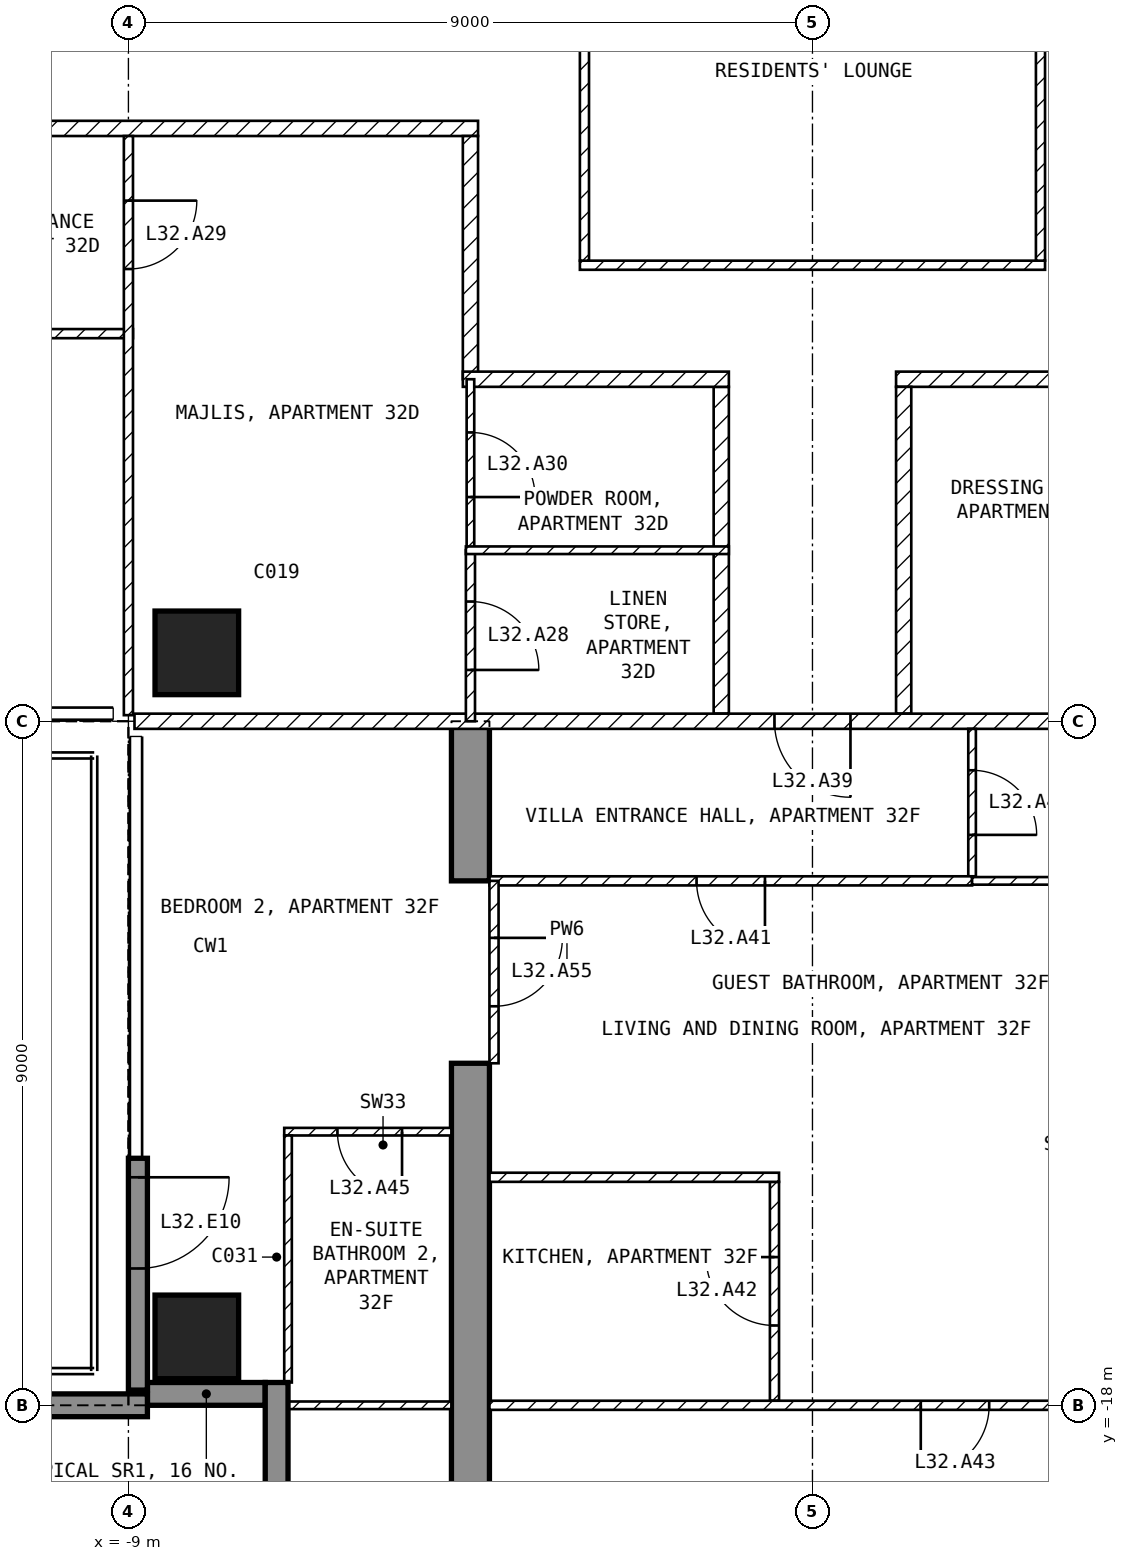
"""IFC4 building model, lengths in metres.
Left out: names, types, materials, properties, quantities, classifications, styles, units other than length and angle.
Written with IfcOpenShell. Run it as: python <this file> out.ifc"""

import sys

from ifc_helpers import new_model, si_unit, direction, frame, frame_2d, origin, origin_2d, place, context, subcontext, project, spatial, polyline, rectangle, outline, extrude, element, fill, save


model = new_model("IFC4")
c1 = context("Model", 3, precision=1e-05, world=origin(), true_north=direction((0.0, 1.0)))
c2 = subcontext(c1, "Body", "Model", "MODEL_VIEW")
j1 = project(units=[si_unit("LENGTHUNIT", "METRE"), si_unit("PLANEANGLEUNIT", "RADIAN")], contexts=[c1])
p1 = place(None, origin())
s1 = spatial("IfcSite", under=j1, at=p1, CompositionType="ELEMENT")
p2 = place(p1, origin())
s2 = spatial("IfcBuilding", under=s1, at=p2, CompositionType="ELEMENT")
p3 = place(p2, frame((0.0, 0.0, 133.9)))
s3 = spatial("IfcBuildingStorey", under=s2, at=p3, CompositionType="ELEMENT", Elevation=133.9)
for number, where, z_axis, x_axis in (
    (1, (-8.1, -17.1, -0.25), (0.0, 0.0, 1.0), (1.0, 0.0, 0.0)),
    (2, (-8.1, -8.1, -0.25), (0.0, 0.0, 1.0), (1.0, 0.0, 0.0)),
):
    element("IfcColumn", number, at=place(p3, frame(where, z_axis=z_axis, x_axis=x_axis)), inside=s3, PredefinedType="COLUMN", context=c2, shape_type="SweptSolid", body=[
        extrude(rectangle(XDim=1.1, YDim=1.1, at=origin_2d()), origin(), (0.0, 0.0, 1.0), 3.5),
    ])
p4 = place(p3, frame((-4.75, -20.15, -0.25), z_axis=(1.0, 0.0, 0.0), x_axis=(0.0, 1.0, 0.0)))
e3 = element("IfcWall", 3, at=p4, inside=s3, PredefinedType="SHEAR", context=c2, shape_type="SweptSolid", body=[
    extrude(outline(polyline([(0.0, 0.0), (6.65, 0.0), (6.65, 2.65), (9.05, 2.65), (9.05, 0.0), (11.15, 0.0), (11.15, 3.5), (0.0, 3.5), (0.0, 0.0)])), origin(), (0.0, 0.0, 1.0), 0.5),
])
p5 = place(p3, frame((-8.875, -14.75, 0.0), z_axis=(0.0, 0.0, 1.0), x_axis=(0.0, -1.0, 0.0)))
e4 = element("IfcWall", 4, at=p5, inside=s3, PredefinedType="SOLIDWALL", context=c2, shape_type="SweptSolid", body=[
    extrude(rectangle(XDim=3.05, YDim=0.25, at=frame_2d((1.525, 0.0))), origin(), (0.0, 0.0, 1.0), 3.25),
])
p6 = place(p5, frame((0.25, 0.0, 0.0)))
e5 = element("IfcOpeningElement", 5, at=p6, cuts=e4, PredefinedType="OPENING", context=c2, shape_type="SweptSolid", body=[
    extrude(rectangle(XDim=1.2, YDim=2.4, at=frame_2d((0.6, 1.2))), frame((0.0, 0.135, 0.0), z_axis=(0.0, -1.0, 0.0), x_axis=(1.0, 0.0, 0.0)), (0.0, 0.0, 1.0), 0.27),
])
p7 = place(p3, frame((-8.75, -17.85, 0.0), z_axis=(0.0, 0.0, 1.0), x_axis=(1.0, 0.0, 0.0)))
e6 = element("IfcWall", 6, at=p7, inside=s3, PredefinedType="SOLIDWALL", context=c2, shape_type="SweptSolid", body=[
    extrude(rectangle(XDim=1.55, YDim=0.3, at=frame_2d((0.775, 0.0))), origin(), (0.0, 0.0, 1.0), 3.25),
])
p8 = place(p3, frame((-7.05, -17.7, 0.0), z_axis=(0.0, 0.0, 1.0), x_axis=(0.0, -1.0, 0.0)))
e7 = element("IfcWall", 7, at=p8, inside=s3, PredefinedType="SOLIDWALL", context=c2, shape_type="SweptSolid", body=[
    extrude(rectangle(XDim=1.8, YDim=0.3, at=frame_2d((0.9, 0.0))), origin(), (0.0, 0.0, 1.0), 3.25),
])
p9 = place(p3, frame((-8.75, -18.0, 0.0), z_axis=(0.0, 0.0, 1.0), x_axis=(-1.0, 0.0, 0.0)))
e8 = element("IfcWall", 8, at=p9, inside=s3, PredefinedType="SOLIDWALL", context=c2, shape_type="SweptSolid", body=[
    extrude(rectangle(XDim=2.99, YDim=0.3, at=frame_2d((1.495, 0.0))), origin(), (0.0, 0.0, 1.0), 3.25),
])
p10 = place(p3, frame((-3.06, -3.0, 0.0), z_axis=(0.0, 0.0, 1.0), x_axis=(1.0, 0.0, 0.0)))
e9 = element("IfcWall", 9, at=p10, inside=s3, PredefinedType="PARTITIONING", context=c2, shape_type="SweptSolid", body=[
    extrude(rectangle(XDim=6.12, YDim=0.12, at=frame_2d((3.06, 0.0))), origin(), (0.0, 0.0, 1.0), 3.25),
])
for number, where, z_axis, x_axis in (
    (10, (3.0, -2.94, 0.0), (0.0, 0.0, 1.0), (0.0, 1.0, 0.0)),
    (11, (-3.0, 2.94, 0.0), (0.0, 0.0, 1.0), (0.0, -1.0, 0.0)),
):
    element("IfcWall", number, at=place(p3, frame(where, z_axis=z_axis, x_axis=x_axis)), inside=s3, PredefinedType="PARTITIONING", context=c2, shape_type="SweptSolid", body=[
        extrude(rectangle(XDim=5.88, YDim=0.12, at=frame_2d((2.94, 0.0))), origin(), (0.0, 0.0, 1.0), 3.25),
    ])
p11 = place(p3, frame((4.6, -4.5, 0.0), z_axis=(0.0, 0.0, 1.0), x_axis=(-1.0, 0.0, 0.0)))
e12 = element("IfcWall", 12, at=p11, inside=s3, PredefinedType="PARTITIONING", context=c2, shape_type="SweptSolid", body=[
    extrude(rectangle(XDim=3.5, YDim=0.2, at=frame_2d((1.75, 0.0))), origin(), (0.0, 0.0, 1.0), 3.25),
])
p12 = place(p3, frame((1.2, -4.6, 0.0), z_axis=(0.0, 0.0, 1.0), x_axis=(0.0, -1.0, 0.0)))
e13 = element("IfcWall", 13, at=p12, inside=s3, PredefinedType="PARTITIONING", context=c2, shape_type="SweptSolid", body=[
    extrude(rectangle(XDim=4.3, YDim=0.2, at=frame_2d((2.15, 0.0))), origin(), (0.0, 0.0, 1.0), 3.25),
])
p13 = place(p3, frame((-4.4, -1.2, 0.0), z_axis=(0.0, 0.0, 1.0), x_axis=(-1.0, 0.0, 0.0)))
e14 = element("IfcWall", 14, at=p13, inside=s3, PredefinedType="PARTITIONING", context=c2, shape_type="SweptSolid", body=[
    extrude(rectangle(XDim=17.2, YDim=0.2, at=frame_2d((8.6, 0.0))), origin(), (0.0, 0.0, 1.0), 3.25),
])
p14 = place(p13, frame((5.9, 0.0, 0.0)))
e15 = element("IfcOpeningElement", 15, at=p14, cuts=e14, PredefinedType="OPENING", context=c2, shape_type="SweptSolid", body=[
    extrude(rectangle(XDim=1.0, YDim=2.1, at=frame_2d((0.5, 1.05))), frame((0.0, 0.11, 0.0), z_axis=(0.0, -1.0, 0.0), x_axis=(1.0, 0.0, 0.0)), (0.0, 0.0, 1.0), 0.22),
])
p15 = place(p3, frame((-4.5, -4.5, 0.0), z_axis=(0.0, 0.0, 1.0), x_axis=(0.0, 1.0, 0.0)))
e16 = element("IfcWall", 16, at=p15, inside=s3, PredefinedType="PARTITIONING", context=c2, shape_type="SweptSolid", body=[
    extrude(rectangle(XDim=3.2, YDim=0.2, at=frame_2d((1.6, 0.0))), origin(), (0.0, 0.0, 1.0), 3.25),
])
p16 = place(p3, frame((-1.2, -8.9, 0.0), z_axis=(0.0, 0.0, 1.0), x_axis=(0.0, 1.0, 0.0)))
e17 = element("IfcWall", 17, at=p16, inside=s3, PredefinedType="PARTITIONING", context=c2, shape_type="SweptSolid", body=[
    extrude(rectangle(XDim=4.3, YDim=0.2, at=frame_2d((2.15, 0.0))), origin(), (0.0, 0.0, 1.0), 3.25),
])
p17 = place(p3, frame((-1.1, -4.5, 0.0), z_axis=(0.0, 0.0, 1.0), x_axis=(-1.0, 0.0, 0.0)))
e18 = element("IfcWall", 18, at=p17, inside=s3, PredefinedType="PARTITIONING", context=c2, shape_type="SweptSolid", body=[
    extrude(rectangle(XDim=3.5, YDim=0.2, at=frame_2d((1.75, 0.0))), origin(), (0.0, 0.0, 1.0), 3.25),
])
p18 = place(p3, frame((8.92, -9.0, 0.0), z_axis=(0.0, 0.0, 1.0), x_axis=(-1.0, 0.0, 0.0)))
e19 = element("IfcWall", 19, at=p18, inside=s3, PredefinedType="PARTITIONING", context=c2, shape_type="SweptSolid", body=[
    extrude(rectangle(XDim=17.84, YDim=0.2, at=frame_2d((8.92, 0.0))), origin(), (0.0, 0.0, 1.0), 3.25),
])
p19 = place(p18, frame((8.42, 0.0, 0.0)))
e20 = element("IfcOpeningElement", 20, at=p19, cuts=e19, PredefinedType="OPENING", context=c2, shape_type="SweptSolid", body=[
    extrude(rectangle(XDim=1.0, YDim=2.1, at=frame_2d((0.5, 1.05))), frame((0.0, 0.11, 0.0), z_axis=(0.0, -1.0, 0.0), x_axis=(1.0, 0.0, 0.0)), (0.0, 0.0, 1.0), 0.22),
])
p20 = place(p3, frame((-8.94, -3.9, 0.0), z_axis=(0.0, 0.0, 1.0), x_axis=(-1.0, 0.0, 0.0)))
e21 = element("IfcWall", 21, at=p20, inside=s3, PredefinedType="PARTITIONING", context=c2, shape_type="SweptSolid", body=[
    extrude(rectangle(XDim=8.46, YDim=0.12, at=frame_2d((4.23, 0.0))), origin(), (0.0, 0.0, 1.0), 3.25),
])
p21 = place(p20, frame((7.11, 0.0, 0.0)))
e22 = element("IfcOpeningElement", 22, at=p21, cuts=e21, PredefinedType="OPENING", context=c2, shape_type="SweptSolid", body=[
    extrude(rectangle(XDim=0.9, YDim=2.1, at=frame_2d((0.45, 1.05))), frame((0.0, 0.07, 0.0), z_axis=(0.0, -1.0, 0.0), x_axis=(1.0, 0.0, 0.0)), (0.0, 0.0, 1.0), 0.14),
])
p22 = place(p20, frame((1.41, 0.0, 0.0)))
e23 = element("IfcOpeningElement", 23, at=p22, cuts=e21, PredefinedType="OPENING", context=c2, shape_type="SweptSolid", body=[
    extrude(rectangle(XDim=0.9, YDim=2.1, at=frame_2d((0.45, 1.05))), frame((0.0, 0.07, 0.0), z_axis=(0.0, -1.0, 0.0), x_axis=(1.0, 0.0, 0.0)), (0.0, 0.0, 1.0), 0.14),
])
p23 = place(p3, frame((-9.0, -1.3, 0.0), z_axis=(0.0, 0.0, 1.0), x_axis=(0.0, -1.0, 0.0)))
e24 = element("IfcWall", 24, at=p23, inside=s3, PredefinedType="PARTITIONING", context=c2, shape_type="SweptSolid", body=[
    extrude(rectangle(XDim=7.62, YDim=0.12, at=frame_2d((3.81, 0.0))), origin(), (0.0, 0.0, 1.0), 3.25),
])
p24 = place(p23, frame((0.85, 0.0, 0.0)))
e25 = element("IfcOpeningElement", 25, at=p24, cuts=e24, PredefinedType="OPENING", context=c2, shape_type="SweptSolid", body=[
    extrude(rectangle(XDim=0.9, YDim=2.1, at=frame_2d((0.45, 1.05))), frame((0.0, 0.07, 0.0), z_axis=(0.0, -1.0, 0.0), x_axis=(1.0, 0.0, 0.0)), (0.0, 0.0, 1.0), 0.14),
])
p25 = place(p3, frame((-4.5, -4.5, 0.0), z_axis=(0.0, 0.0, 1.0), x_axis=(0.0, -1.0, 0.0)))
e26 = element("IfcWall", 26, at=p25, inside=s3, PredefinedType="PARTITIONING", context=c2, shape_type="SweptSolid", body=[
    extrude(rectangle(XDim=2.25, YDim=0.1, at=frame_2d((1.125, 0.0))), origin(), (0.0, 0.0, 1.0), 3.25),
])
p26 = place(p25, frame((0.7, 0.0, 0.0)))
e27 = element("IfcOpeningElement", 27, at=p26, cuts=e26, PredefinedType="OPENING", context=c2, shape_type="SweptSolid", body=[
    extrude(rectangle(XDim=0.85, YDim=2.1, at=frame_2d((0.425, 1.05))), frame((0.0, 0.06, 0.0), z_axis=(0.0, -1.0, 0.0), x_axis=(1.0, 0.0, 0.0)), (0.0, 0.0, 1.0), 0.12),
])
p27 = place(p3, frame((-4.5, -6.75, 0.0), z_axis=(0.0, 0.0, 1.0), x_axis=(0.0, -1.0, 0.0)))
e28 = element("IfcWall", 28, at=p27, inside=s3, PredefinedType="PARTITIONING", context=c2, shape_type="SweptSolid", body=[
    extrude(rectangle(XDim=2.25, YDim=0.12, at=frame_2d((1.125, 0.0))), origin(), (0.0, 0.0, 1.0), 3.25),
])
p28 = place(p27, frame((0.675, 0.0, 0.0)))
e29 = element("IfcOpeningElement", 29, at=p28, cuts=e28, PredefinedType="OPENING", context=c2, shape_type="SweptSolid", body=[
    extrude(rectangle(XDim=0.9, YDim=2.1, at=frame_2d((0.45, 1.05))), frame((0.0, 0.07, 0.0), z_axis=(0.0, -1.0, 0.0), x_axis=(1.0, 0.0, 0.0)), (0.0, 0.0, 1.0), 0.14),
])
p29 = place(p3, frame((-1.1, -6.75, 0.0), z_axis=(0.0, 0.0, 1.0), x_axis=(-1.0, 0.0, 0.0)))
e30 = element("IfcWall", 30, at=p29, inside=s3, PredefinedType="PARTITIONING", context=c2, shape_type="SweptSolid", body=[
    extrude(rectangle(XDim=3.46, YDim=0.1, at=frame_2d((1.73, 0.0))), origin(), (0.0, 0.0, 1.0), 3.25),
])
p30 = place(p3, frame((2.1, -9.1, 0.0), z_axis=(0.0, 0.0, 1.0), x_axis=(0.0, -1.0, 0.0)))
e31 = element("IfcWall", 31, at=p30, inside=s3, PredefinedType="PARTITIONING", context=c2, shape_type="SweptSolid", body=[
    extrude(rectangle(XDim=1.94, YDim=0.1, at=frame_2d((0.97, 0.0))), origin(), (0.0, 0.0, 1.0), 3.25),
])
p31 = place(p30, frame((0.545, 0.0, 0.0)))
e32 = element("IfcOpeningElement", 32, at=p31, cuts=e31, PredefinedType="OPENING", context=c2, shape_type="SweptSolid", body=[
    extrude(rectangle(XDim=0.85, YDim=2.1, at=frame_2d((0.425, 1.05))), frame((0.0, 0.06, 0.0), z_axis=(0.0, -1.0, 0.0), x_axis=(1.0, 0.0, 0.0)), (0.0, 0.0, 1.0), 0.12),
])
p32 = place(p3, frame((2.1, -11.1, 0.0), z_axis=(0.0, 0.0, 1.0), x_axis=(-1.0, 0.0, 0.0)))
e33 = element("IfcWall", 33, at=p32, inside=s3, PredefinedType="PARTITIONING", context=c2, shape_type="SweptSolid", body=[
    extrude(rectangle(XDim=6.35, YDim=0.12, at=frame_2d((3.175, 0.0))), origin(), (0.0, 0.0, 1.0), 3.25),
])
p33 = place(p32, frame((2.725, 0.0, 0.0)))
e34 = element("IfcOpeningElement", 34, at=p33, cuts=e33, PredefinedType="OPENING", context=c2, shape_type="SweptSolid", body=[
    extrude(rectangle(XDim=0.9, YDim=2.1, at=frame_2d((0.45, 1.05))), frame((0.0, 0.07, 0.0), z_axis=(0.0, -1.0, 0.0), x_axis=(1.0, 0.0, 0.0)), (0.0, 0.0, 1.0), 0.14),
])
p34 = place(p3, frame((4.25, -11.1, 0.0), z_axis=(0.0, 0.0, 1.0), x_axis=(-1.0, 0.0, 0.0)))
e35 = element("IfcWall", 35, at=p34, inside=s3, PredefinedType="PARTITIONING", context=c2, shape_type="SweptSolid", body=[
    extrude(rectangle(XDim=2.15, YDim=0.1, at=frame_2d((1.075, 0.0))), origin(), (0.0, 0.0, 1.0), 3.25),
])
p35 = place(p3, frame((-0.5, -17.94, 0.0), z_axis=(0.0, 0.0, 1.0), x_axis=(0.0, 1.0, 0.0)))
e36 = element("IfcWall", 36, at=p35, inside=s3, PredefinedType="PARTITIONING", context=c2, shape_type="SweptSolid", body=[
    extrude(rectangle(XDim=2.88, YDim=0.12, at=frame_2d((1.44, 0.0))), origin(), (0.0, 0.0, 1.0), 3.25),
])
p36 = place(p35, frame((0.99, 0.0, 0.0)))
e37 = element("IfcOpeningElement", 37, at=p36, cuts=e36, PredefinedType="OPENING", context=c2, shape_type="SweptSolid", body=[
    extrude(rectangle(XDim=0.9, YDim=2.1, at=frame_2d((0.45, 1.05))), frame((0.0, 0.07, 0.0), z_axis=(0.0, -1.0, 0.0), x_axis=(1.0, 0.0, 0.0)), (0.0, 0.0, 1.0), 0.14),
])
p37 = place(p3, frame((-0.44, -15.0, 0.0), z_axis=(0.0, 0.0, 1.0), x_axis=(-1.0, 0.0, 0.0)))
e38 = element("IfcWall", 38, at=p37, inside=s3, PredefinedType="PARTITIONING", context=c2, shape_type="SweptSolid", body=[
    extrude(rectangle(XDim=3.81, YDim=0.12, at=frame_2d((1.905, 0.0))), origin(), (0.0, 0.0, 1.0), 3.25),
])
p38 = place(p3, frame((4.25, -18.0, 0.0), z_axis=(0.0, 0.0, 1.0), x_axis=(-1.0, 0.0, 0.0)))
e39 = element("IfcWall", 39, at=p38, inside=s3, PredefinedType="PARTITIONING", context=c2, shape_type="SweptSolid", body=[
    extrude(rectangle(XDim=8.5, YDim=0.12, at=frame_2d((4.25, 0.0))), origin(), (0.0, 0.0, 1.0), 3.25),
])
p39 = place(p38, frame((1.925, 0.0, 0.0)))
e40 = element("IfcOpeningElement", 40, at=p39, cuts=e39, PredefinedType="OPENING", context=c2, shape_type="SweptSolid", body=[
    extrude(rectangle(XDim=0.9, YDim=2.1, at=frame_2d((0.45, 1.05))), frame((0.0, 0.07, 0.0), z_axis=(0.0, -1.0, 0.0), x_axis=(1.0, 0.0, 0.0)), (0.0, 0.0, 1.0), 0.14),
])
p40 = place(p3, frame((-4.75, -14.4, 0.0), z_axis=(0.0, 0.0, 1.0), x_axis=(-1.0, 0.0, 0.0)))
e41 = element("IfcWall", 41, at=p40, inside=s3, PredefinedType="PARTITIONING", context=c2, shape_type="SweptSolid", body=[
    extrude(rectangle(XDim=2.2, YDim=0.1, at=frame_2d((1.1, 0.0))), origin(), (0.0, 0.0, 1.0), 3.25),
])
p41 = place(p40, frame((0.65, 0.0, 0.0)))
e42 = element("IfcOpeningElement", 42, at=p41, cuts=e41, PredefinedType="OPENING", context=c2, shape_type="SweptSolid", body=[
    extrude(rectangle(XDim=0.85, YDim=2.1, at=frame_2d((0.425, 1.05))), frame((0.0, 0.06, 0.0), z_axis=(0.0, -1.0, 0.0), x_axis=(1.0, 0.0, 0.0)), (0.0, 0.0, 1.0), 0.12),
])
p42 = place(p3, frame((-6.9, -14.45, 0.0), z_axis=(0.0, 0.0, 1.0), x_axis=(0.0, -1.0, 0.0)))
e43 = element("IfcWall", 43, at=p42, inside=s3, PredefinedType="PARTITIONING", context=c2, shape_type="SweptSolid", body=[
    extrude(rectangle(XDim=3.25, YDim=0.1, at=frame_2d((1.625, 0.0))), origin(), (0.0, 0.0, 1.0), 3.25),
])
p43 = place(p3, frame((-4.75, -18.0, 0.0), z_axis=(0.0, 0.0, 1.0), x_axis=(-1.0, 0.0, 0.0)))
e44 = element("IfcWall", 44, at=p43, inside=s3, PredefinedType="PARTITIONING", context=c2, shape_type="SweptSolid", body=[
    extrude(rectangle(XDim=2.37, YDim=0.1, at=frame_2d((1.185, 0.0))), origin(), (0.0, 0.0, 1.0), 3.25),
])
p44 = place(p3, frame((-4.19, -11.1, 0.0), z_axis=(0.0, 0.0, 1.0), x_axis=(0.0, -1.0, 0.0)))
e45 = element("IfcWall", 45, at=p44, inside=s3, PredefinedType="PARTITIONING", context=c2, shape_type="SweptSolid", body=[
    extrude(rectangle(XDim=2.4, YDim=0.12, at=frame_2d((1.2, 0.0))), origin(), (0.0, 0.0, 1.0), 2.4),
])
p45 = place(p44, frame((0.75, 0.0, 0.0)))
e46 = element("IfcOpeningElement", 46, at=p45, cuts=e45, PredefinedType="OPENING", context=c2, shape_type="SweptSolid", body=[
    extrude(rectangle(XDim=0.9, YDim=2.1, at=frame_2d((0.45, 1.05))), frame((0.0, 0.07, 0.0), z_axis=(0.0, -1.0, 0.0), x_axis=(1.0, 0.0, 0.0)), (0.0, 0.0, 1.0), 0.14),
])
p46 = place(p6, origin())
e47 = element("IfcDoor", 47, at=p46, inside=s3, OperationType="SINGLE_SWING_LEFT", PredefinedType="DOOR", context=c2, shape_type="SweptSolid", body=[
    extrude(rectangle(XDim=1.2, YDim=2.4, at=frame_2d((0.6, 1.2))), frame((0.0, 0.025, 0.0), z_axis=(0.0, -1.0, 0.0), x_axis=(1.0, 0.0, 0.0)), (0.0, 0.0, 1.0), 0.05),
])
fill(e5, e47)
p47 = place(p28, origin())
e48 = element("IfcDoor", 48, at=p47, inside=s3, OperationType="SINGLE_SWING_RIGHT", PredefinedType="DOOR", context=c2, shape_type="SweptSolid", body=[
    extrude(rectangle(XDim=0.9, YDim=2.1, at=frame_2d((0.45, 1.05))), frame((0.0, 0.025, 0.0), z_axis=(0.0, -1.0, 0.0), x_axis=(1.0, 0.0, 0.0)), (0.0, 0.0, 1.0), 0.05),
])
fill(e29, e48)
p48 = place(p24, origin())
e49 = element("IfcDoor", 49, at=p48, inside=s3, OperationType="SINGLE_SWING_LEFT", PredefinedType="DOOR", context=c2, shape_type="SweptSolid", body=[
    extrude(rectangle(XDim=0.9, YDim=2.1, at=frame_2d((0.45, 1.05))), frame((0.0, 0.025, 0.0), z_axis=(0.0, -1.0, 0.0), x_axis=(1.0, 0.0, 0.0)), (0.0, 0.0, 1.0), 0.05),
])
fill(e25, e49)
p49 = place(p26, origin())
e50 = element("IfcDoor", 50, at=p49, inside=s3, OperationType="SINGLE_SWING_RIGHT", PredefinedType="DOOR", context=c2, shape_type="SweptSolid", body=[
    extrude(rectangle(XDim=0.85, YDim=2.1, at=frame_2d((0.425, 1.05))), frame((0.0, 0.025, 0.0), z_axis=(0.0, -1.0, 0.0), x_axis=(1.0, 0.0, 0.0)), (0.0, 0.0, 1.0), 0.05),
])
fill(e27, e50)
p50 = place(p19, origin())
e51 = element("IfcDoor", 51, at=p50, inside=s3, OperationType="SINGLE_SWING_LEFT", PredefinedType="DOOR", context=c2, shape_type="SweptSolid", body=[
    extrude(rectangle(XDim=1.0, YDim=2.1, at=frame_2d((0.5, 1.05))), frame((0.0, 0.025, 0.0), z_axis=(0.0, -1.0, 0.0), x_axis=(1.0, 0.0, 0.0)), (0.0, 0.0, 1.0), 0.05),
])
fill(e20, e51)
p51 = place(p31, origin())
e52 = element("IfcDoor", 52, at=p51, inside=s3, OperationType="SINGLE_SWING_RIGHT", PredefinedType="DOOR", context=c2, shape_type="SweptSolid", body=[
    extrude(rectangle(XDim=0.85, YDim=2.1, at=frame_2d((0.425, 1.05))), frame((0.0, 0.025, 0.0), z_axis=(0.0, -1.0, 0.0), x_axis=(1.0, 0.0, 0.0)), (0.0, 0.0, 1.0), 0.05),
])
fill(e32, e52)
p52 = place(p33, origin())
e53 = element("IfcDoor", 53, at=p52, inside=s3, OperationType="SINGLE_SWING_LEFT", PredefinedType="DOOR", context=c2, shape_type="SweptSolid", body=[
    extrude(rectangle(XDim=0.9, YDim=2.1, at=frame_2d((0.45, 1.05))), frame((0.0, 0.025, 0.0), z_axis=(0.0, -1.0, 0.0), x_axis=(1.0, 0.0, 0.0)), (0.0, 0.0, 1.0), 0.05),
])
fill(e34, e53)
p53 = place(p36, origin())
e54 = element("IfcDoor", 54, at=p53, inside=s3, OperationType="SINGLE_SWING_RIGHT", PredefinedType="DOOR", context=c2, shape_type="SweptSolid", body=[
    extrude(rectangle(XDim=0.9, YDim=2.1, at=frame_2d((0.45, 1.05))), frame((0.0, 0.025, 0.0), z_axis=(0.0, -1.0, 0.0), x_axis=(1.0, 0.0, 0.0)), (0.0, 0.0, 1.0), 0.05),
])
fill(e37, e54)
p54 = place(p39, origin())
e55 = element("IfcDoor", 55, at=p54, inside=s3, OperationType="SINGLE_SWING_RIGHT", PredefinedType="DOOR", context=c2, shape_type="SweptSolid", body=[
    extrude(rectangle(XDim=0.9, YDim=2.1, at=frame_2d((0.45, 1.05))), frame((0.0, 0.025, 0.0), z_axis=(0.0, -1.0, 0.0), x_axis=(1.0, 0.0, 0.0)), (0.0, 0.0, 1.0), 0.05),
])
fill(e40, e55)
p55 = place(p41, origin())
e56 = element("IfcDoor", 56, at=p55, inside=s3, OperationType="SINGLE_SWING_LEFT", PredefinedType="DOOR", context=c2, shape_type="SweptSolid", body=[
    extrude(rectangle(XDim=0.85, YDim=2.1, at=frame_2d((0.425, 1.05))), frame((0.0, 0.025, 0.0), z_axis=(0.0, -1.0, 0.0), x_axis=(1.0, 0.0, 0.0)), (0.0, 0.0, 1.0), 0.05),
])
fill(e42, e56)
p56 = place(p45, origin())
e57 = element("IfcDoor", 57, at=p56, inside=s3, OperationType="SINGLE_SWING_LEFT", PredefinedType="DOOR", context=c2, shape_type="SweptSolid", body=[
    extrude(rectangle(XDim=0.9, YDim=2.1, at=frame_2d((0.45, 1.05))), frame((0.0, 0.025, 0.0), z_axis=(0.0, -1.0, 0.0), x_axis=(1.0, 0.0, 0.0)), (0.0, 0.0, 1.0), 0.05),
])
fill(e46, e57)
save(model, sys.argv[1])
